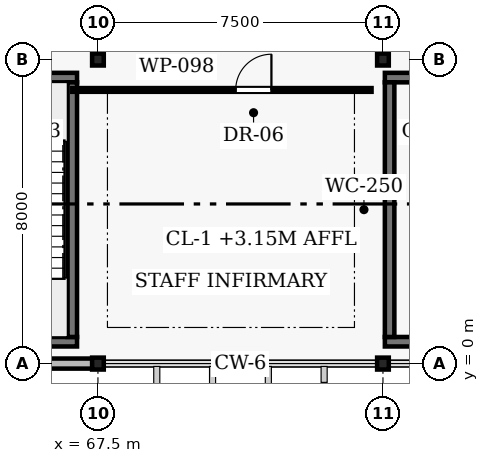
"""IFC4 building model, lengths in metres.
Left out: names, types, materials, properties, quantities, classifications, styles, units other than length and angle.
Written with IfcOpenShell. Run it as: python <this file> out.ifc"""

import sys

from ifc_helpers import new_model, si_unit, direction, frame, frame_2d, origin, origin_2d, place, context, subcontext, project, spatial, rectangle, i_section, extrude, element, fill, save


model = new_model("IFC4")
c1 = context("Model", 3, precision=1e-05, world=origin(), true_north=direction((0.0, 1.0)))
c2 = subcontext(c1, "Body", "Model", "MODEL_VIEW")
j1 = project(units=[si_unit("LENGTHUNIT", "METRE"), si_unit("PLANEANGLEUNIT", "RADIAN")], contexts=[c1])
p1 = place(None, origin())
s1 = spatial("IfcSite", under=j1, at=p1, CompositionType="ELEMENT")
p2 = place(p1, origin())
s2 = spatial("IfcBuilding", under=s1, at=p2, CompositionType="ELEMENT")
p3 = place(p2, frame((0.0, 0.0, 4.5)))
s3 = spatial("IfcBuildingStorey", under=s2, at=p3, CompositionType="ELEMENT", Elevation=4.5)
for number, where, z_axis, x_axis in (
    (1, (67.5, 0.0, 0.0), (0.0, 0.0, 1.0), (1.0, 0.0, 0.0)),
    (2, (67.5, 8.0, 0.0), (0.0, 0.0, 1.0), (1.0, 0.0, 0.0)),
    (3, (75.0, 0.0, 0.0), (0.0, 0.0, 1.0), (1.0, 0.0, 0.0)),
    (4, (75.0, 8.0, 0.0), (0.0, 0.0, 1.0), (1.0, 0.0, 0.0)),
):
    element("IfcColumn", number, at=place(p3, frame(where, z_axis=z_axis, x_axis=x_axis)), inside=s3, PredefinedType="COLUMN", context=c2, shape_type="SweptSolid", body=[
        extrude(i_section(OverallWidth=0.307, OverallDepth=0.314, WebThickness=0.012, FlangeThickness=0.019, FilletRadius=0.015, at=origin_2d()), origin(), (0.0, 0.0, 1.0), 4.28),
    ])
p4 = place(p3, frame((60.08, 0.0, 0.0), z_axis=(0.0, 0.0, 1.0), x_axis=(1.0, 0.0, 0.0)))
e5 = element("IfcWall", 5, at=p4, inside=s3, PredefinedType="SOLIDWALL", context=c2, shape_type="SweptSolid", body=[
    extrude(rectangle(XDim=7.34, YDim=0.265, at=frame_2d((3.67, 0.0))), origin(), (0.0, 0.0, 1.0), 3.85),
])
p5 = place(p4, frame((1.2, 0.0, 1.05)))
e6 = element("IfcOpeningElement", 6, at=p5, cuts=e5, PredefinedType="OPENING", context=c2, shape_type="SweptSolid", body=[
    extrude(rectangle(XDim=1.5, YDim=1.5, at=frame_2d((0.75, 0.75))), frame((0.0, 0.142, 0.0), z_axis=(0.0, -1.0, 0.0), x_axis=(1.0, 0.0, 0.0)), (0.0, 0.0, 1.0), 0.285),
])
p6 = place(p4, frame((4.1, 0.0, 1.05)))
e7 = element("IfcOpeningElement", 7, at=p6, cuts=e5, PredefinedType="OPENING", context=c2, shape_type="SweptSolid", body=[
    extrude(rectangle(XDim=1.5, YDim=1.65, at=frame_2d((0.75, 0.825))), frame((0.0, 0.142, 0.0), z_axis=(0.0, -1.0, 0.0), x_axis=(1.0, 0.0, 0.0)), (0.0, 0.0, 1.0), 0.285),
])
p7 = place(p3, frame((60.55, 0.575, 0.0), z_axis=(0.0, 0.0, 1.0), x_axis=(1.0, 0.0, 0.0)))
e8 = element("IfcWall", 8, at=p7, inside=s3, PredefinedType="SHEAR", context=c2, shape_type="SweptSolid", body=[
    extrude(rectangle(XDim=6.4, YDim=0.25, at=frame_2d((3.2, 0.0))), origin(), (0.0, 0.0, 1.0), 4.5),
])
p8 = place(p3, frame((60.55, 7.525, 0.0), z_axis=(0.0, 0.0, 1.0), x_axis=(1.0, 0.0, 0.0)))
e9 = element("IfcWall", 9, at=p8, inside=s3, PredefinedType="SHEAR", context=c2, shape_type="SweptSolid", body=[
    extrude(rectangle(XDim=6.4, YDim=0.25, at=frame_2d((3.2, 0.0))), origin(), (0.0, 0.0, 1.0), 4.5),
])
p9 = place(p8, frame((0.8, 0.0, 0.0)))
e10 = element("IfcOpeningElement", 10, at=p9, cuts=e9, PredefinedType="OPENING", context=c2, shape_type="SweptSolid", body=[
    extrude(rectangle(XDim=1.1, YDim=2.15, at=frame_2d((0.55, 1.075))), frame((0.0, 0.135, 0.0), z_axis=(0.0, -1.0, 0.0), x_axis=(1.0, 0.0, 0.0)), (0.0, 0.0, 1.0), 0.27),
])
p10 = place(p8, frame((3.775, 0.0, 0.0)))
e11 = element("IfcOpeningElement", 11, at=p10, cuts=e9, PredefinedType="OPENING", context=c2, shape_type="SweptSolid", body=[
    extrude(rectangle(XDim=1.25, YDim=2.15, at=frame_2d((0.625, 1.075))), frame((0.0, 0.135, 0.0), z_axis=(0.0, -1.0, 0.0), x_axis=(1.0, 0.0, 0.0)), (0.0, 0.0, 1.0), 0.27),
])
p11 = place(p3, frame((66.825, 0.7, 0.0), z_axis=(0.0, 0.0, 1.0), x_axis=(0.0, 1.0, 0.0)))
e12 = element("IfcWall", 12, at=p11, inside=s3, PredefinedType="SHEAR", context=c2, shape_type="SweptSolid", body=[
    extrude(rectangle(XDim=6.7, YDim=0.25, at=frame_2d((3.35, 0.0))), origin(), (0.0, 0.0, 1.0), 4.5),
])
p12 = place(p3, frame((75.05, 0.575, 0.0), z_axis=(0.0, 0.0, 1.0), x_axis=(1.0, 0.0, 0.0)))
e13 = element("IfcWall", 13, at=p12, inside=s3, PredefinedType="SHEAR", context=c2, shape_type="SweptSolid", body=[
    extrude(rectangle(XDim=6.4, YDim=0.25, at=frame_2d((3.2, 0.0))), origin(), (0.0, 0.0, 1.0), 4.5),
])
p13 = place(p3, frame((75.05, 7.525, 0.0), z_axis=(0.0, 0.0, 1.0), x_axis=(1.0, 0.0, 0.0)))
e14 = element("IfcWall", 14, at=p13, inside=s3, PredefinedType="SHEAR", context=c2, shape_type="SweptSolid", body=[
    extrude(rectangle(XDim=6.4, YDim=0.25, at=frame_2d((3.2, 0.0))), origin(), (0.0, 0.0, 1.0), 4.5),
])
p14 = place(p13, frame((3.775, 0.0, 0.0)))
e15 = element("IfcOpeningElement", 15, at=p14, cuts=e14, PredefinedType="OPENING", context=c2, shape_type="SweptSolid", body=[
    extrude(rectangle(XDim=1.25, YDim=2.15, at=frame_2d((0.625, 1.075))), frame((0.0, 0.135, 0.0), z_axis=(0.0, -1.0, 0.0), x_axis=(1.0, 0.0, 0.0)), (0.0, 0.0, 1.0), 0.27),
])
p15 = place(p3, frame((75.175, 0.7, 0.0), z_axis=(0.0, 0.0, 1.0), x_axis=(0.0, 1.0, 0.0)))
e16 = element("IfcWall", 16, at=p15, inside=s3, PredefinedType="SHEAR", context=c2, shape_type="SweptSolid", body=[
    extrude(rectangle(XDim=6.7, YDim=0.25, at=frame_2d((3.35, 0.0))), origin(), (0.0, 0.0, 1.0), 4.5),
])
p16 = place(p3, frame((66.825, 7.2, 0.0), z_axis=(0.0, 0.0, 1.0), x_axis=(1.0, 0.0, 0.0)))
e17 = element("IfcWall", 17, at=p16, inside=s3, PredefinedType="PARTITIONING", context=c2, shape_type="SweptSolid", body=[
    extrude(rectangle(XDim=7.875, YDim=0.098, at=frame_2d((3.938, 0.0))), origin(), (0.0, 0.0, 1.0), 3.7),
])
p17 = place(p16, frame((4.3, 0.0, 0.0)))
e18 = element("IfcOpeningElement", 18, at=p17, cuts=e17, PredefinedType="OPENING", context=c2, shape_type="SweptSolid", body=[
    extrude(rectangle(XDim=0.94, YDim=2.12, at=frame_2d((0.47, 1.06))), frame((0.0, 0.059, 0.0), z_axis=(0.0, -1.0, 0.0), x_axis=(1.0, 0.0, 0.0)), (0.0, 0.0, 1.0), 0.118),
])
p18 = place(p17, origin())
e19 = element("IfcDoor", 19, at=p18, inside=s3, OperationType="SINGLE_SWING_RIGHT", PredefinedType="DOOR", context=c2, shape_type="SweptSolid", body=[
    extrude(rectangle(XDim=0.94, YDim=2.12, at=frame_2d((0.47, 1.06))), frame((0.0, 0.025, 0.0), z_axis=(0.0, -1.0, 0.0), x_axis=(1.0, 0.0, 0.0)), (0.0, 0.0, 1.0), 0.05),
])
fill(e18, e19)
save(model, sys.argv[1])
